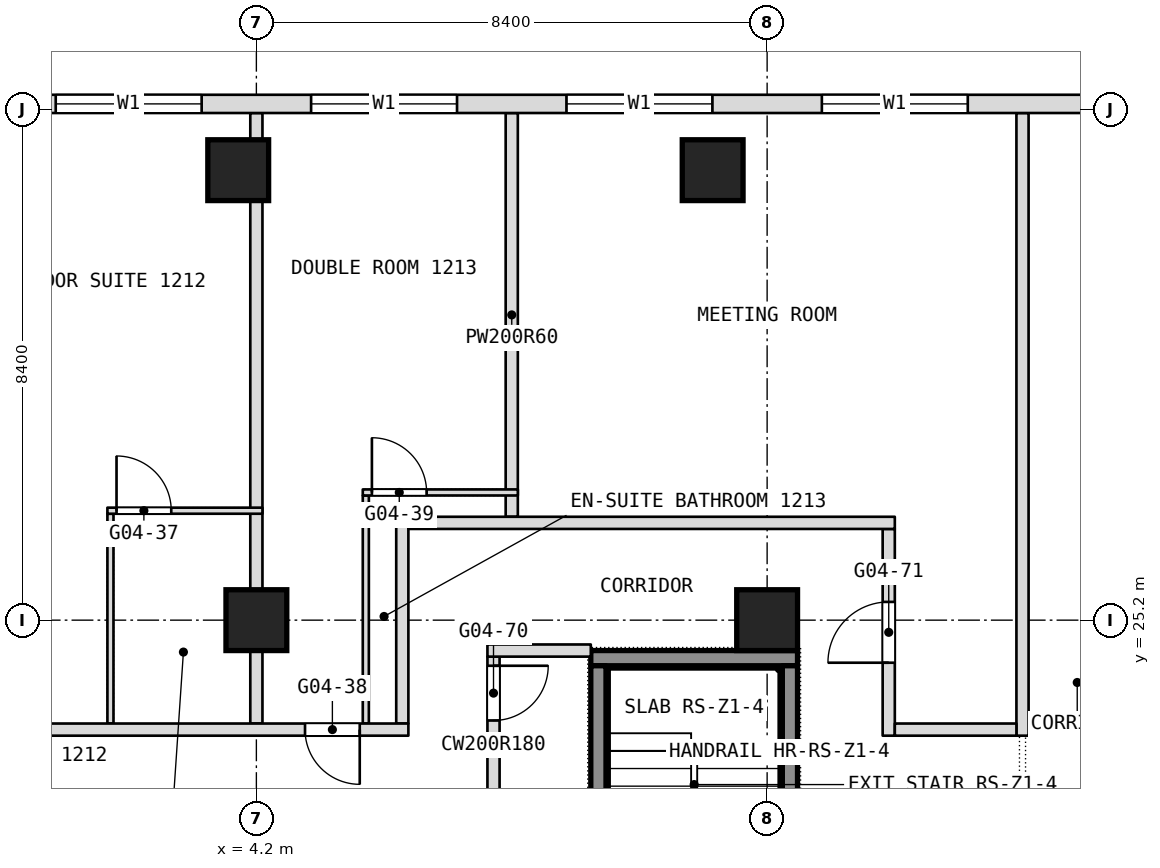
"""IFC4 building model, lengths in metres.
Left out: names, types, materials, properties, quantities, classifications, styles, units other than length and angle.
Written with IfcOpenShell. Run it as: python <this file> out.ifc"""

import sys

from ifc_helpers import new_model, si_unit, direction, frame, frame_2d, origin, origin_2d, place, context, subcontext, project, spatial, rectangle, extrude, element, fill, save


model = new_model("IFC4")
c1 = context("Model", 3, precision=1e-05, world=origin(), true_north=direction((0.0, 1.0)))
c2 = subcontext(c1, "Body", "Model", "MODEL_VIEW")
j1 = project(units=[si_unit("LENGTHUNIT", "METRE"), si_unit("PLANEANGLEUNIT", "RADIAN")], contexts=[c1])
p1 = place(None, origin())
s1 = spatial("IfcSite", under=j1, at=p1, CompositionType="ELEMENT")
p2 = place(p1, origin())
s2 = spatial("IfcBuilding", under=s1, at=p2, CompositionType="ELEMENT")
p3 = place(p2, frame((0.0, 0.0, 58.1)))
s3 = spatial("IfcBuildingStorey", under=s2, at=p3, CompositionType="ELEMENT", Elevation=58.1)
for number, where, z_axis, x_axis in (
    (1, (4.2, 25.2, 0.0), (0.0, 0.0, 1.0), (1.0, 0.0, 0.0)),
    (2, (12.6, 25.2, 0.0), (0.0, 0.0, 1.0), (1.0, 0.0, 0.0)),
    (3, (3.901, 32.6, 0.0), (0.0, 0.0, 1.0), (1.0, 0.0, 0.0)),
    (4, (11.704, 32.6, 0.0), (0.0, 0.0, 1.0), (1.0, 0.0, 0.0)),
):
    element("IfcColumn", number, at=place(p3, frame(where, z_axis=z_axis, x_axis=x_axis)), inside=s3, PredefinedType="COLUMN", context=c2, shape_type="SweptSolid", body=[
        extrude(rectangle(XDim=1.0, YDim=1.0, at=origin_2d()), origin(), (0.0, 0.0, 1.0), 3.6),
    ])
p4 = place(p3, frame((16.8, 23.3, 0.0), z_axis=(0.0, 0.0, 1.0), x_axis=(0.0, 1.0, 0.0)))
e5 = element("IfcWall", 5, at=p4, inside=s3, PredefinedType="PARTITIONING", context=c2, shape_type="SweptSolid", body=[
    extrude(rectangle(XDim=10.24, YDim=0.2, at=frame_2d((5.12, 0.0))), origin(), (0.0, 0.0, 1.0), 3.34),
])
p5 = place(p3, frame((14.6, 23.3, 0.0), z_axis=(0.0, 0.0, 1.0), x_axis=(0.0, 1.0, 0.0)))
e6 = element("IfcWall", 6, at=p5, inside=s3, PredefinedType="PARTITIONING", context=c2, shape_type="SweptSolid", body=[
    extrude(rectangle(XDim=3.4, YDim=0.2, at=frame_2d((1.7, 0.0))), origin(), (0.0, 0.0, 1.0), 3.34),
])
p6 = place(p5, frame((1.2, 0.0, 0.0)))
e7 = element("IfcOpeningElement", 7, at=p6, cuts=e6, PredefinedType="OPENING", context=c2, shape_type="SweptSolid", body=[
    extrude(rectangle(XDim=1.0, YDim=2.1, at=frame_2d((0.5, 1.05))), frame((0.0, 0.1, 0.0), z_axis=(0.0, -1.0, 0.0), x_axis=(1.0, 0.0, 0.0)), (0.0, 0.0, 1.0), 0.2),
])
p7 = place(p3, frame((8.4, 26.9, 0.0), z_axis=(0.0, 0.0, 1.0), x_axis=(0.0, 1.0, 0.0)))
e8 = element("IfcWall", 8, at=p7, inside=s3, PredefinedType="PARTITIONING", context=c2, shape_type="SweptSolid", body=[
    extrude(rectangle(XDim=6.64, YDim=0.2, at=frame_2d((3.32, 0.0))), origin(), (0.0, 0.0, 1.0), 3.34),
])
p8 = place(p3, frame((8.1, 21.7, 0.0), z_axis=(0.0, 0.0, 1.0), x_axis=(0.0, 1.0, 0.0)))
e9 = element("IfcWall", 9, at=p8, inside=s3, PredefinedType="PARTITIONING", context=c2, shape_type="SweptSolid", body=[
    extrude(rectangle(XDim=2.9, YDim=0.2, at=frame_2d((1.45, 0.0))), origin(), (0.0, 0.0, 1.0), 3.34),
])
p9 = place(p8, frame((1.85, 0.0, 0.0)))
e10 = element("IfcOpeningElement", 10, at=p9, cuts=e9, PredefinedType="OPENING", context=c2, shape_type="SweptSolid", body=[
    extrude(rectangle(XDim=0.9, YDim=2.1, at=frame_2d((0.45, 1.05))), frame((0.0, 0.1, 0.0), z_axis=(0.0, -1.0, 0.0), x_axis=(1.0, 0.0, 0.0)), (0.0, 0.0, 1.0), 0.2),
])
p10 = place(p3, frame((6.6, 23.5, 0.0), z_axis=(0.0, 0.0, 1.0), x_axis=(0.0, 1.0, 0.0)))
e11 = element("IfcWall", 11, at=p10, inside=s3, PredefinedType="PARTITIONING", context=c2, shape_type="SweptSolid", body=[
    extrude(rectangle(XDim=3.4, YDim=0.2, at=frame_2d((1.7, 0.0))), origin(), (0.0, 0.0, 1.0), 3.34),
])
p11 = place(p3, frame((6.0, 23.5, 0.0), z_axis=(0.0, 0.0, 1.0), x_axis=(0.0, 1.0, 0.0)))
e12 = element("IfcWall", 12, at=p11, inside=s3, PredefinedType="PARTITIONING", context=c2, shape_type="SweptSolid", body=[
    extrude(rectangle(XDim=3.75, YDim=0.1, at=frame_2d((1.875, 0.0))), origin(), (0.0, 0.0, 1.0), 3.34),
])
p12 = place(p3, frame((4.2, 23.5, 0.0), z_axis=(0.0, 0.0, 1.0), x_axis=(0.0, 1.0, 0.0)))
e13 = element("IfcWall", 13, at=p12, inside=s3, PredefinedType="PARTITIONING", context=c2, shape_type="SweptSolid", body=[
    extrude(rectangle(XDim=10.04, YDim=0.2, at=frame_2d((5.02, 0.0))), origin(), (0.0, 0.0, 1.0), 3.34),
])
p13 = place(p3, frame((1.8, 23.5, 0.0), z_axis=(0.0, 0.0, 1.0), x_axis=(0.0, 1.0, 0.0)))
e14 = element("IfcWall", 14, at=p13, inside=s3, PredefinedType="PARTITIONING", context=c2, shape_type="SweptSolid", body=[
    extrude(rectangle(XDim=3.45, YDim=0.1, at=frame_2d((1.725, 0.0))), origin(), (0.0, 0.0, 1.0), 3.34),
])
p14 = place(p3, frame((-16.7, 23.4, 0.0), z_axis=(0.0, 0.0, 1.0), x_axis=(1.0, 0.0, 0.0)))
e15 = element("IfcWall", 15, at=p14, inside=s3, PredefinedType="PARTITIONING", context=c2, shape_type="SweptSolid", body=[
    extrude(rectangle(XDim=23.4, YDim=0.2, at=frame_2d((11.7, 0.0))), origin(), (0.0, 0.0, 1.0), 3.34),
])
p15 = place(p14, frame((2.4, 0.0, 0.0)))
e16 = element("IfcOpeningElement", 16, at=p15, cuts=e15, PredefinedType="OPENING", context=c2, shape_type="SweptSolid", body=[
    extrude(rectangle(XDim=0.9, YDim=2.1, at=frame_2d((0.45, 1.05))), frame((0.0, 0.1, 0.0), z_axis=(0.0, -1.0, 0.0), x_axis=(1.0, 0.0, 0.0)), (0.0, 0.0, 1.0), 0.2),
])
p16 = place(p14, frame((4.9, 0.0, 0.0)))
e17 = element("IfcOpeningElement", 17, at=p16, cuts=e15, PredefinedType="OPENING", context=c2, shape_type="SweptSolid", body=[
    extrude(rectangle(XDim=0.9, YDim=2.1, at=frame_2d((0.45, 1.05))), frame((0.0, 0.1, 0.0), z_axis=(0.0, -1.0, 0.0), x_axis=(1.0, 0.0, 0.0)), (0.0, 0.0, 1.0), 0.2),
])
p17 = place(p14, frame((10.8, 0.0, 0.0)))
e18 = element("IfcOpeningElement", 18, at=p17, cuts=e15, PredefinedType="OPENING", context=c2, shape_type="SweptSolid", body=[
    extrude(rectangle(XDim=0.9, YDim=2.1, at=frame_2d((0.45, 1.05))), frame((0.0, 0.1, 0.0), z_axis=(0.0, -1.0, 0.0), x_axis=(1.0, 0.0, 0.0)), (0.0, 0.0, 1.0), 0.2),
])
p18 = place(p14, frame((16.2, 0.0, 0.0)))
e19 = element("IfcOpeningElement", 19, at=p18, cuts=e15, PredefinedType="OPENING", context=c2, shape_type="SweptSolid", body=[
    extrude(rectangle(XDim=1.1, YDim=2.1, at=frame_2d((0.55, 1.05))), frame((0.0, 0.1, 0.0), z_axis=(0.0, -1.0, 0.0), x_axis=(1.0, 0.0, 0.0)), (0.0, 0.0, 1.0), 0.2),
])
p19 = place(p14, frame((21.7, 0.0, 0.0)))
e20 = element("IfcOpeningElement", 20, at=p19, cuts=e15, PredefinedType="OPENING", context=c2, shape_type="SweptSolid", body=[
    extrude(rectangle(XDim=0.9, YDim=2.1, at=frame_2d((0.45, 1.05))), frame((0.0, 0.1, 0.0), z_axis=(0.0, -1.0, 0.0), x_axis=(1.0, 0.0, 0.0)), (0.0, 0.0, 1.0), 0.2),
])
p20 = place(p3, frame((14.7, 23.4, 0.0), z_axis=(0.0, 0.0, 1.0), x_axis=(1.0, 0.0, 0.0)))
e21 = element("IfcWall", 21, at=p20, inside=s3, PredefinedType="PARTITIONING", context=c2, shape_type="SweptSolid", body=[
    extrude(rectangle(XDim=2.0, YDim=0.2, at=frame_2d((1.0, 0.0))), origin(), (0.0, 0.0, 1.0), 3.34),
])
p21 = place(p3, frame((8.0, 24.7, 0.0), z_axis=(0.0, 0.0, 1.0), x_axis=(1.0, 0.0, 0.0)))
e22 = element("IfcWall", 22, at=p21, inside=s3, PredefinedType="PARTITIONING", context=c2, shape_type="SweptSolid", body=[
    extrude(rectangle(XDim=1.7, YDim=0.2, at=frame_2d((0.85, 0.0))), origin(), (0.0, 0.0, 1.0), 3.34),
])
p22 = place(p3, frame((6.7, 26.8, 0.0), z_axis=(0.0, 0.0, 1.0), x_axis=(1.0, 0.0, 0.0)))
e23 = element("IfcWall", 23, at=p22, inside=s3, PredefinedType="PARTITIONING", context=c2, shape_type="SweptSolid", body=[
    extrude(rectangle(XDim=8.0, YDim=0.2, at=frame_2d((4.0, 0.0))), origin(), (0.0, 0.0, 1.0), 3.34),
])
p23 = place(p3, frame((1.75, 27.0, 0.0), z_axis=(0.0, 0.0, 1.0), x_axis=(1.0, 0.0, 0.0)))
e24 = element("IfcWall", 24, at=p23, inside=s3, PredefinedType="PARTITIONING", context=c2, shape_type="SweptSolid", body=[
    extrude(rectangle(XDim=2.55, YDim=0.1, at=frame_2d((1.275, 0.0))), origin(), (0.0, 0.0, 1.0), 3.34),
])
p24 = place(p23, frame((0.15, 0.0, 0.0)))
e25 = element("IfcOpeningElement", 25, at=p24, cuts=e24, PredefinedType="OPENING", context=c2, shape_type="SweptSolid", body=[
    extrude(rectangle(XDim=0.9, YDim=2.1, at=frame_2d((0.45, 1.05))), frame((0.0, 0.05, 0.0), z_axis=(0.0, -1.0, 0.0), x_axis=(1.0, 0.0, 0.0)), (0.0, 0.0, 1.0), 0.1),
])
p25 = place(p3, frame((5.95, 27.3, 0.0), z_axis=(0.0, 0.0, 1.0), x_axis=(1.0, 0.0, 0.0)))
e26 = element("IfcWall", 26, at=p25, inside=s3, PredefinedType="PARTITIONING", context=c2, shape_type="SweptSolid", body=[
    extrude(rectangle(XDim=2.55, YDim=0.1, at=frame_2d((1.275, 0.0))), origin(), (0.0, 0.0, 1.0), 3.34),
])
p26 = place(p25, frame((0.15, 0.0, 0.0)))
e27 = element("IfcOpeningElement", 27, at=p26, cuts=e26, PredefinedType="OPENING", context=c2, shape_type="SweptSolid", body=[
    extrude(rectangle(XDim=0.9, YDim=2.1, at=frame_2d((0.45, 1.05))), frame((0.0, 0.05, 0.0), z_axis=(0.0, -1.0, 0.0), x_axis=(1.0, 0.0, 0.0)), (0.0, 0.0, 1.0), 0.1),
])
p27 = place(p3, frame((23.406, 33.69, 0.0), z_axis=(0.0, 0.0, 1.0), x_axis=(-1.0, 0.0, 0.0)))
e28 = element("IfcWall", 28, at=p27, inside=s3, PredefinedType="NOTDEFINED", context=c2, shape_type="SweptSolid", body=[
    extrude(rectangle(XDim=46.812, YDim=0.3, at=frame_2d((23.406, 0.0))), origin(), (0.0, 0.0, 1.0), 3.6),
])
p28 = place(p27, frame((2.186, 0.0, 0.9)))
e29 = element("IfcOpeningElement", 29, at=p28, cuts=e28, PredefinedType="OPENING", context=c2, shape_type="SweptSolid", body=[
    extrude(rectangle(XDim=2.4, YDim=2.1, at=frame_2d((1.2, 1.05))), frame((0.0, 0.15, 0.0), z_axis=(0.0, -1.0, 0.0), x_axis=(1.0, 0.0, 0.0)), (0.0, 0.0, 1.0), 0.3),
])
p29 = place(p27, frame((7.506, 0.0, 0.9)))
e30 = element("IfcOpeningElement", 30, at=p29, cuts=e28, PredefinedType="OPENING", context=c2, shape_type="SweptSolid", body=[
    extrude(rectangle(XDim=2.4, YDim=2.1, at=frame_2d((1.2, 1.05))), frame((0.0, 0.15, 0.0), z_axis=(0.0, -1.0, 0.0), x_axis=(1.0, 0.0, 0.0)), (0.0, 0.0, 1.0), 0.3),
])
p30 = place(p27, frame((11.706, 0.0, 0.9)))
e31 = element("IfcOpeningElement", 31, at=p30, cuts=e28, PredefinedType="OPENING", context=c2, shape_type="SweptSolid", body=[
    extrude(rectangle(XDim=2.4, YDim=2.1, at=frame_2d((1.2, 1.05))), frame((0.0, 0.15, 0.0), z_axis=(0.0, -1.0, 0.0), x_axis=(1.0, 0.0, 0.0)), (0.0, 0.0, 1.0), 0.3),
])
p31 = place(p27, frame((15.906, 0.0, 0.9)))
e32 = element("IfcOpeningElement", 32, at=p31, cuts=e28, PredefinedType="OPENING", context=c2, shape_type="SweptSolid", body=[
    extrude(rectangle(XDim=2.4, YDim=2.1, at=frame_2d((1.2, 1.05))), frame((0.0, 0.15, 0.0), z_axis=(0.0, -1.0, 0.0), x_axis=(1.0, 0.0, 0.0)), (0.0, 0.0, 1.0), 0.3),
])
p32 = place(p27, frame((20.106, 0.0, 0.9)))
e33 = element("IfcOpeningElement", 33, at=p32, cuts=e28, PredefinedType="OPENING", context=c2, shape_type="SweptSolid", body=[
    extrude(rectangle(XDim=2.4, YDim=2.1, at=frame_2d((1.2, 1.05))), frame((0.0, 0.15, 0.0), z_axis=(0.0, -1.0, 0.0), x_axis=(1.0, 0.0, 0.0)), (0.0, 0.0, 1.0), 0.3),
])
p33 = place(p27, frame((24.306, 0.0, 0.9)))
e34 = element("IfcOpeningElement", 34, at=p33, cuts=e28, PredefinedType="OPENING", context=c2, shape_type="SweptSolid", body=[
    extrude(rectangle(XDim=2.4, YDim=2.1, at=frame_2d((1.2, 1.05))), frame((0.0, 0.15, 0.0), z_axis=(0.0, -1.0, 0.0), x_axis=(1.0, 0.0, 0.0)), (0.0, 0.0, 1.0), 0.3),
])
p34 = place(p27, frame((28.506, 0.0, 0.9)))
e35 = element("IfcOpeningElement", 35, at=p34, cuts=e28, PredefinedType="OPENING", context=c2, shape_type="SweptSolid", body=[
    extrude(rectangle(XDim=2.4, YDim=2.1, at=frame_2d((1.2, 1.05))), frame((0.0, 0.15, 0.0), z_axis=(0.0, -1.0, 0.0), x_axis=(1.0, 0.0, 0.0)), (0.0, 0.0, 1.0), 0.3),
])
p35 = place(p27, frame((32.706, 0.0, 0.9)))
e36 = element("IfcOpeningElement", 36, at=p35, cuts=e28, PredefinedType="OPENING", context=c2, shape_type="SweptSolid", body=[
    extrude(rectangle(XDim=2.4, YDim=2.1, at=frame_2d((1.2, 1.05))), frame((0.0, 0.15, 0.0), z_axis=(0.0, -1.0, 0.0), x_axis=(1.0, 0.0, 0.0)), (0.0, 0.0, 1.0), 0.3),
])
p36 = place(p27, frame((36.906, 0.0, 0.9)))
e37 = element("IfcOpeningElement", 37, at=p36, cuts=e28, PredefinedType="OPENING", context=c2, shape_type="SweptSolid", body=[
    extrude(rectangle(XDim=2.4, YDim=2.1, at=frame_2d((1.2, 1.05))), frame((0.0, 0.15, 0.0), z_axis=(0.0, -1.0, 0.0), x_axis=(1.0, 0.0, 0.0)), (0.0, 0.0, 1.0), 0.3),
])
p37 = place(p27, frame((42.226, 0.0, 0.9)))
e38 = element("IfcOpeningElement", 38, at=p37, cuts=e28, PredefinedType="OPENING", context=c2, shape_type="SweptSolid", body=[
    extrude(rectangle(XDim=2.4, YDim=2.1, at=frame_2d((1.2, 1.05))), frame((0.0, 0.15, 0.0), z_axis=(0.0, -1.0, 0.0), x_axis=(1.0, 0.0, 0.0)), (0.0, 0.0, 1.0), 0.3),
])
p38 = place(p3, frame((9.7, 24.575, 0.1), z_axis=(0.0, 0.0, 1.0), x_axis=(1.0, 0.0, 0.0)))
e39 = element("IfcWall", 39, at=p38, inside=s3, PredefinedType="SHEAR", context=c2, shape_type="SweptSolid", body=[
    extrude(rectangle(XDim=3.4, YDim=0.25, at=frame_2d((1.7, 0.0))), origin(), (0.0, 0.0, 1.0), 3.6),
])
p39 = place(p3, frame((9.825, 18.75, 0.1), z_axis=(0.0, 0.0, 1.0), x_axis=(0.0, 1.0, 0.0)))
e40 = element("IfcWall", 40, at=p39, inside=s3, PredefinedType="SHEAR", context=c2, shape_type="SweptSolid", body=[
    extrude(rectangle(XDim=5.7, YDim=0.25, at=frame_2d((2.85, 0.0))), origin(), (0.0, 0.0, 1.0), 3.6),
])
p40 = place(p39, frame((0.2, 0.0, 0.0)))
e41 = element("IfcOpeningElement", 41, at=p40, cuts=e40, PredefinedType="OPENING", context=c2, shape_type="SweptSolid", body=[
    extrude(rectangle(XDim=1.0, YDim=2.1, at=frame_2d((0.5, 1.05))), frame((0.0, 0.125, 0.0), z_axis=(0.0, -1.0, 0.0), x_axis=(1.0, 0.0, 0.0)), (0.0, 0.0, 1.0), 0.25),
])
p41 = place(p3, frame((12.975, 18.75, 0.1), z_axis=(0.0, 0.0, 1.0), x_axis=(0.0, 1.0, 0.0)))
e42 = element("IfcWall", 42, at=p41, inside=s3, PredefinedType="SHEAR", context=c2, shape_type="SweptSolid", body=[
    extrude(rectangle(XDim=5.7, YDim=0.25, at=frame_2d((2.85, 0.0))), origin(), (0.0, 0.0, 1.0), 3.6),
])
p42 = place(p6, origin())
e43 = element("IfcDoor", 43, at=p42, inside=s3, OperationType="SINGLE_SWING_LEFT", PredefinedType="DOOR", context=c2, shape_type="SweptSolid", body=[
    extrude(rectangle(XDim=1.0, YDim=2.1, at=frame_2d((0.5, 1.05))), frame((0.0, 0.025, 0.0), z_axis=(0.0, -1.0, 0.0), x_axis=(1.0, 0.0, 0.0)), (0.0, 0.0, 1.0), 0.05),
])
fill(e7, e43)
p43 = place(p9, origin())
e44 = element("IfcDoor", 44, at=p43, inside=s3, OperationType="SINGLE_SWING_LEFT", PredefinedType="DOOR", context=c2, shape_type="SweptSolid", body=[
    extrude(rectangle(XDim=0.9, YDim=2.1, at=frame_2d((0.45, 1.05))), frame((0.0, 0.025, 0.0), z_axis=(0.0, -1.0, 0.0), x_axis=(1.0, 0.0, 0.0)), (0.0, 0.0, 1.0), 0.05),
])
fill(e10, e44)
p44 = place(p19, origin())
e45 = element("IfcDoor", 45, at=p44, inside=s3, OperationType="SINGLE_SWING_RIGHT", PredefinedType="DOOR", context=c2, shape_type="SweptSolid", body=[
    extrude(rectangle(XDim=0.9, YDim=2.1, at=frame_2d((0.45, 1.05))), frame((0.0, 0.025, 0.0), z_axis=(0.0, -1.0, 0.0), x_axis=(1.0, 0.0, 0.0)), (0.0, 0.0, 1.0), 0.05),
])
fill(e20, e45)
p45 = place(p24, origin())
e46 = element("IfcDoor", 46, at=p45, inside=s3, OperationType="SINGLE_SWING_RIGHT", PredefinedType="DOOR", context=c2, shape_type="SweptSolid", body=[
    extrude(rectangle(XDim=0.9, YDim=2.1, at=frame_2d((0.45, 1.05))), frame((0.0, 0.025, 0.0), z_axis=(0.0, -1.0, 0.0), x_axis=(1.0, 0.0, 0.0)), (0.0, 0.0, 1.0), 0.05),
])
fill(e25, e46)
p46 = place(p26, origin())
e47 = element("IfcDoor", 47, at=p46, inside=s3, OperationType="SINGLE_SWING_RIGHT", PredefinedType="DOOR", context=c2, shape_type="SweptSolid", body=[
    extrude(rectangle(XDim=0.9, YDim=2.1, at=frame_2d((0.45, 1.05))), frame((0.0, 0.025, 0.0), z_axis=(0.0, -1.0, 0.0), x_axis=(1.0, 0.0, 0.0)), (0.0, 0.0, 1.0), 0.05),
])
fill(e27, e47)
p47 = place(p29, origin())
e48 = element("IfcWindow", 48, at=p47, inside=s3, PartitioningType="SINGLE_PANEL", PredefinedType="WINDOW", context=c2, shape_type="SweptSolid", body=[
    extrude(rectangle(XDim=2.4, YDim=2.1, at=frame_2d((1.2, 1.05))), frame((0.0, 0.03, 0.0), z_axis=(0.0, -1.0, 0.0), x_axis=(1.0, 0.0, 0.0)), (0.0, 0.0, 1.0), 0.06),
])
fill(e30, e48)
p48 = place(p30, origin())
e49 = element("IfcWindow", 49, at=p48, inside=s3, PartitioningType="SINGLE_PANEL", PredefinedType="WINDOW", context=c2, shape_type="SweptSolid", body=[
    extrude(rectangle(XDim=2.4, YDim=2.1, at=frame_2d((1.2, 1.05))), frame((0.0, 0.03, 0.0), z_axis=(0.0, -1.0, 0.0), x_axis=(1.0, 0.0, 0.0)), (0.0, 0.0, 1.0), 0.06),
])
fill(e31, e49)
p49 = place(p31, origin())
e50 = element("IfcWindow", 50, at=p49, inside=s3, PartitioningType="SINGLE_PANEL", PredefinedType="WINDOW", context=c2, shape_type="SweptSolid", body=[
    extrude(rectangle(XDim=2.4, YDim=2.1, at=frame_2d((1.2, 1.05))), frame((0.0, 0.03, 0.0), z_axis=(0.0, -1.0, 0.0), x_axis=(1.0, 0.0, 0.0)), (0.0, 0.0, 1.0), 0.06),
])
fill(e32, e50)
p50 = place(p32, origin())
e51 = element("IfcWindow", 51, at=p50, inside=s3, PartitioningType="SINGLE_PANEL", PredefinedType="WINDOW", context=c2, shape_type="SweptSolid", body=[
    extrude(rectangle(XDim=2.4, YDim=2.1, at=frame_2d((1.2, 1.05))), frame((0.0, 0.03, 0.0), z_axis=(0.0, -1.0, 0.0), x_axis=(1.0, 0.0, 0.0)), (0.0, 0.0, 1.0), 0.06),
])
fill(e33, e51)
save(model, sys.argv[1])
